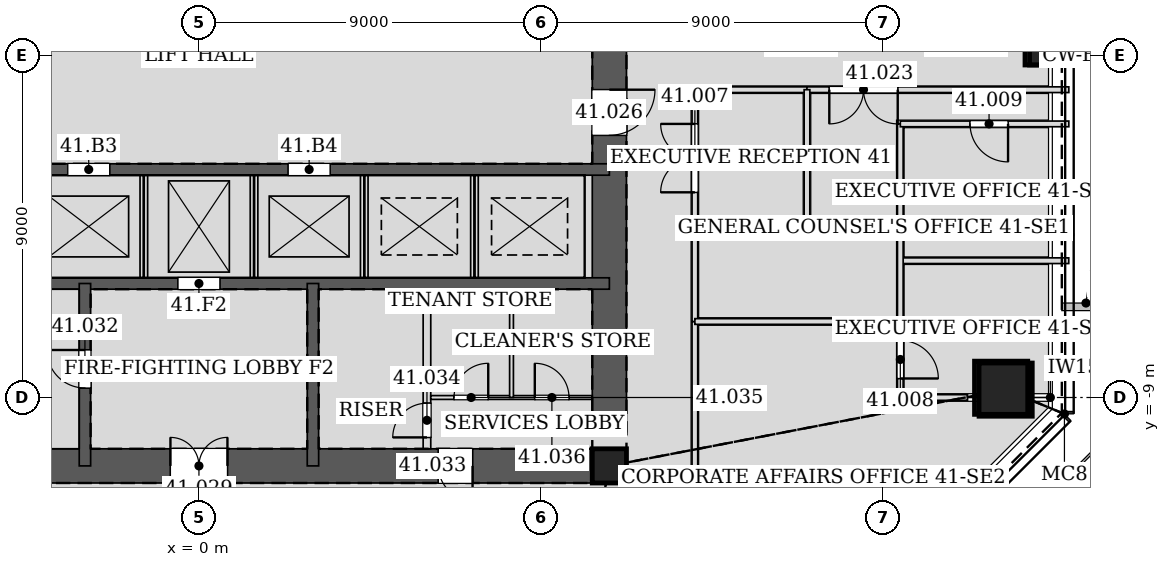
"""IFC4 building model, lengths in metres.
Left out: names, types, materials, properties, quantities, classifications, styles, units other than length and angle.
Written with IfcOpenShell. Run it as: python <this file> out.ifc"""

import sys

from ifc_helpers import new_model, si_unit, direction, frame, frame_2d, origin, origin_2d, place, context, subcontext, project, spatial, rectangle, hollow_rectangle, extrude, element, fill, save


model = new_model("IFC4")
c1 = context("Model", 3, precision=1e-05, world=origin(), true_north=direction((0.0, 1.0)))
c2 = subcontext(c1, "Body", "Model", "MODEL_VIEW")
j1 = project(units=[si_unit("LENGTHUNIT", "METRE"), si_unit("PLANEANGLEUNIT", "RADIAN")], contexts=[c1])
p1 = place(None, origin())
s1 = spatial("IfcSite", under=j1, at=p1, CompositionType="ELEMENT")
p2 = place(p1, origin())
s2 = spatial("IfcBuilding", under=s1, at=p2, CompositionType="ELEMENT")
p3 = place(p2, frame((0.0, 0.0, 180.6)))
s3 = spatial("IfcBuildingStorey", under=s2, at=p3, CompositionType="ELEMENT", Elevation=180.6)
p4 = place(p3, frame((21.228, -8.793, 0.0), z_axis=(-0.028237693676, 0.011678552323, 0.999533012997), x_axis=(-0.382183844423, -0.924086310396, 0.0)))
e1 = element("IfcColumn", 1, at=p4, inside=s3, PredefinedType="COLUMN", context=c2, shape_type="SweptSolid", body=[
    extrude(hollow_rectangle(XDim=1.4, YDim=1.4, WallThickness=0.065, at=origin_2d()), origin(), (0.0, 0.0, 1.0), 4.202),
])
p5 = place(p3, frame((22.106, 0.0, 0.0), z_axis=(-0.028239619523, 0.0, 0.999601182417), x_axis=(0.0, -1.0, 0.0)))
e2 = element("IfcColumn", 2, at=p5, inside=s3, PredefinedType="COLUMN", context=c2, shape_type="SweptSolid", body=[
    extrude(hollow_rectangle(XDim=0.5, YDim=0.5, WallThickness=0.025, at=origin_2d()), origin(), (0.0, 0.0, 1.0), 4.202),
])
p6 = place(p3, frame((10.8, -10.8, 0.0), z_axis=(0.0, 0.0, 1.0), x_axis=(1.0, 0.0, 0.0)))
e3 = element("IfcColumn", 3, at=p6, inside=s3, PredefinedType="COLUMN", context=c2, shape_type="SweptSolid", body=[
    extrude(hollow_rectangle(XDim=0.9, YDim=0.9, WallThickness=0.06, at=origin_2d()), origin(), (0.0, 0.0, 1.0), 4.2),
])
p7 = place(p3, frame((-10.8, -10.8, 0.0), z_axis=(0.0, 0.0, 1.0), x_axis=(1.0, 0.0, 0.0)))
e4 = element("IfcWall", 4, at=p7, inside=s3, PredefinedType="SOLIDWALL", context=c2, shape_type="SweptSolid", body=[
    extrude(rectangle(XDim=21.6, YDim=0.9, at=frame_2d((10.8, 0.0))), origin(), (0.0, 0.0, 1.0), 4.2),
])
p8 = place(p7, frame((10.05, 0.0, 0.0)))
e5 = element("IfcOpeningElement", 5, at=p8, cuts=e4, PredefinedType="OPENING", context=c2, shape_type="SweptSolid", body=[
    extrude(rectangle(XDim=1.5, YDim=2.1, at=frame_2d((0.75, 1.05))), frame((0.0, 0.46, 0.0), z_axis=(0.0, -1.0, 0.0), x_axis=(1.0, 0.0, 0.0)), (0.0, 0.0, 1.0), 0.92),
])
p9 = place(p7, frame((17.1, 0.0, 0.0)))
e6 = element("IfcOpeningElement", 6, at=p9, cuts=e4, PredefinedType="OPENING", context=c2, shape_type="SweptSolid", body=[
    extrude(rectangle(XDim=0.9, YDim=2.1, at=frame_2d((0.45, 1.05))), frame((0.0, 0.46, 0.0), z_axis=(0.0, -1.0, 0.0), x_axis=(1.0, 0.0, 0.0)), (0.0, 0.0, 1.0), 0.92),
])
p10 = place(p3, frame((10.8, -10.8, 0.0), z_axis=(0.0, 0.0, 1.0), x_axis=(0.0, 1.0, 0.0)))
e7 = element("IfcWall", 7, at=p10, inside=s3, PredefinedType="SOLIDWALL", context=c2, shape_type="SweptSolid", body=[
    extrude(rectangle(XDim=21.6, YDim=0.9, at=frame_2d((10.8, 0.0))), origin(), (0.0, 0.0, 1.0), 4.2),
])
p11 = place(p10, frame((11.7, 0.0, 0.0)))
e8 = element("IfcOpeningElement", 8, at=p11, cuts=e7, PredefinedType="OPENING", context=c2, shape_type="SweptSolid", body=[
    extrude(rectangle(XDim=1.2, YDim=2.1, at=frame_2d((0.6, 1.05))), frame((0.0, 0.46, 0.0), z_axis=(0.0, -1.0, 0.0), x_axis=(1.0, 0.0, 0.0)), (0.0, 0.0, 1.0), 0.92),
])
p12 = place(p10, frame((8.7, 0.0, 0.0)))
e9 = element("IfcOpeningElement", 9, at=p12, cuts=e7, PredefinedType="OPENING", context=c2, shape_type="SweptSolid", body=[
    extrude(rectangle(XDim=1.2, YDim=2.1, at=frame_2d((0.6, 1.05))), frame((0.0, 0.46, 0.0), z_axis=(0.0, -1.0, 0.0), x_axis=(1.0, 0.0, 0.0)), (0.0, 0.0, 1.0), 0.92),
])
p13 = place(p3, frame((-10.8, -3.0, 0.0), z_axis=(0.0, 0.0, 1.0), x_axis=(1.0, 0.0, 0.0)))
e10 = element("IfcWall", 10, at=p13, inside=s3, PredefinedType="SOLIDWALL", context=c2, shape_type="SweptSolid", body=[
    extrude(rectangle(XDim=21.6, YDim=0.3, at=frame_2d((10.8, 0.0))), origin(), (0.0, 0.0, 1.0), 4.2),
])
p14 = place(p13, frame((1.55, 0.0, 0.0)))
e11 = element("IfcOpeningElement", 11, at=p14, cuts=e10, PredefinedType="OPENING", context=c2, shape_type="SweptSolid", body=[
    extrude(rectangle(XDim=1.1, YDim=2.1, at=frame_2d((0.55, 1.05))), frame((0.0, 0.16, 0.0), z_axis=(0.0, -1.0, 0.0), x_axis=(1.0, 0.0, 0.0)), (0.0, 0.0, 1.0), 0.32),
])
p15 = place(p13, frame((4.45, 0.0, 0.0)))
e12 = element("IfcOpeningElement", 12, at=p15, cuts=e10, PredefinedType="OPENING", context=c2, shape_type="SweptSolid", body=[
    extrude(rectangle(XDim=1.1, YDim=2.1, at=frame_2d((0.55, 1.05))), frame((0.0, 0.16, 0.0), z_axis=(0.0, -1.0, 0.0), x_axis=(1.0, 0.0, 0.0)), (0.0, 0.0, 1.0), 0.32),
])
p16 = place(p13, frame((7.35, 0.0, 0.0)))
e13 = element("IfcOpeningElement", 13, at=p16, cuts=e10, PredefinedType="OPENING", context=c2, shape_type="SweptSolid", body=[
    extrude(rectangle(XDim=1.1, YDim=2.1, at=frame_2d((0.55, 1.05))), frame((0.0, 0.16, 0.0), z_axis=(0.0, -1.0, 0.0), x_axis=(1.0, 0.0, 0.0)), (0.0, 0.0, 1.0), 0.32),
])
p17 = place(p13, frame((13.15, 0.0, 0.0)))
e14 = element("IfcOpeningElement", 14, at=p17, cuts=e10, PredefinedType="OPENING", context=c2, shape_type="SweptSolid", body=[
    extrude(rectangle(XDim=1.1, YDim=2.1, at=frame_2d((0.55, 1.05))), frame((0.0, 0.16, 0.0), z_axis=(0.0, -1.0, 0.0), x_axis=(1.0, 0.0, 0.0)), (0.0, 0.0, 1.0), 0.32),
])
p18 = place(p3, frame((-10.8, -6.0, 0.0), z_axis=(0.0, 0.0, 1.0), x_axis=(1.0, 0.0, 0.0)))
e15 = element("IfcWall", 15, at=p18, inside=s3, PredefinedType="SOLIDWALL", context=c2, shape_type="SweptSolid", body=[
    extrude(rectangle(XDim=21.6, YDim=0.3, at=frame_2d((10.8, 0.0))), origin(), (0.0, 0.0, 1.0), 4.2),
])
p19 = place(p18, frame((10.25, 0.0, 0.0)))
e16 = element("IfcOpeningElement", 16, at=p19, cuts=e15, PredefinedType="OPENING", context=c2, shape_type="SweptSolid", body=[
    extrude(rectangle(XDim=1.1, YDim=2.1, at=frame_2d((0.55, 1.05))), frame((0.0, 0.16, 0.0), z_axis=(0.0, -1.0, 0.0), x_axis=(1.0, 0.0, 0.0)), (0.0, 0.0, 1.0), 0.32),
])
p20 = place(p3, frame((-3.0, -6.0, 0.0), z_axis=(0.0, 0.0, 1.0), x_axis=(0.0, -1.0, 0.0)))
e17 = element("IfcWall", 17, at=p20, inside=s3, PredefinedType="SOLIDWALL", context=c2, shape_type="SweptSolid", body=[
    extrude(rectangle(XDim=4.8, YDim=0.3, at=frame_2d((2.4, 0.0))), origin(), (0.0, 0.0, 1.0), 4.2),
])
p21 = place(p20, frame((1.75, 0.0, 0.0)))
e18 = element("IfcOpeningElement", 18, at=p21, cuts=e17, PredefinedType="OPENING", context=c2, shape_type="SweptSolid", body=[
    extrude(rectangle(XDim=1.0, YDim=2.1, at=frame_2d((0.5, 1.05))), frame((0.0, 0.16, 0.0), z_axis=(0.0, -1.0, 0.0), x_axis=(1.0, 0.0, 0.0)), (0.0, 0.0, 1.0), 0.32),
])
p22 = place(p3, frame((3.0, -6.0, 0.0), z_axis=(0.0, 0.0, 1.0), x_axis=(0.0, -1.0, 0.0)))
e19 = element("IfcWall", 19, at=p22, inside=s3, PredefinedType="SOLIDWALL", context=c2, shape_type="SweptSolid", body=[
    extrude(rectangle(XDim=4.8, YDim=0.3, at=frame_2d((2.4, 0.0))), origin(), (0.0, 0.0, 1.0), 4.2),
])
p23 = place(p3, frame((13.05, -4.501, 0.0), z_axis=(0.0, 0.0, 1.0), x_axis=(0.0, 1.0, 0.0)))
e20 = element("IfcWall", 20, at=p23, inside=s3, PredefinedType="PARTITIONING", context=c2, shape_type="SweptSolid", body=[
    extrude(rectangle(XDim=3.601, YDim=0.15, at=frame_2d((1.801, 0.0))), origin(), (0.0, 0.0, 1.0), 4.035),
])
p24 = place(p23, frame((0.9, 0.0, 0.0)))
e21 = element("IfcOpeningElement", 21, at=p24, cuts=e20, PredefinedType="OPENING", context=c2, shape_type="SweptSolid", body=[
    extrude(rectangle(XDim=1.8, YDim=2.4, at=frame_2d((0.9, 1.2))), frame((0.0, 0.085, 0.0), z_axis=(0.0, -1.0, 0.0), x_axis=(1.0, 0.0, 0.0)), (0.0, 0.0, 1.0), 0.17),
])
p25 = place(p3, frame((13.05, -0.9, 0.0), z_axis=(0.0, 0.0, 1.0), x_axis=(1.0, 0.0, 0.0)))
e22 = element("IfcWall", 22, at=p25, inside=s3, PredefinedType="PARTITIONING", context=c2, shape_type="SweptSolid", body=[
    extrude(rectangle(XDim=2.951, YDim=0.15, at=frame_2d((1.476, 0.0))), origin(), (0.0, 0.0, 1.0), 3.426),
])
p26 = place(p3, frame((13.05, -13.05, 0.0), z_axis=(0.0, 0.0, 1.0), x_axis=(0.0, 1.0, 0.0)))
e23 = element("IfcWall", 23, at=p26, inside=s3, PredefinedType="PARTITIONING", context=c2, shape_type="SweptSolid", body=[
    extrude(rectangle(XDim=6.051, YDim=0.15, at=frame_2d((3.025, 0.0))), origin(), (0.0, 0.0, 1.0), 3.167),
])
p27 = place(p3, frame((13.05, -7.001, 0.0), z_axis=(0.0, 0.0, 1.0), x_axis=(0.0, 1.0, 0.0)))
e24 = element("IfcWall", 24, at=p27, inside=s3, PredefinedType="PARTITIONING", context=c2, shape_type="SweptSolid", body=[
    extrude(rectangle(XDim=2.502, YDim=0.15, at=frame_2d((1.251, 0.0))), origin(), (0.0, 0.0, 1.0), 4.035),
])
p28 = place(p3, frame((15.999, -0.9, 0.0), z_axis=(0.0, 0.0, 1.0), x_axis=(1.0, 0.0, 0.0)))
e25 = element("IfcWall", 25, at=p28, inside=s3, PredefinedType="PARTITIONING", context=c2, shape_type="SweptSolid", body=[
    extrude(rectangle(XDim=6.891, YDim=0.15, at=frame_2d((3.445, 0.0))), origin(), (0.0, 0.0, 1.0), 3.426),
])
p29 = place(p28, frame((0.588, 0.0, 0.0)))
e26 = element("IfcOpeningElement", 26, at=p29, cuts=e25, PredefinedType="OPENING", context=c2, shape_type="SweptSolid", body=[
    extrude(rectangle(XDim=1.8, YDim=2.4, at=frame_2d((0.9, 1.2))), frame((0.0, 0.085, 0.0), z_axis=(0.0, -1.0, 0.0), x_axis=(1.0, 0.0, 0.0)), (0.0, 0.0, 1.0), 0.17),
])
p30 = place(p3, frame((13.05, -4.5, 0.0), z_axis=(0.0, 0.0, 1.0), x_axis=(1.0, 0.0, 0.0)))
e27 = element("IfcWall", 27, at=p30, inside=s3, PredefinedType="PARTITIONING", context=c2, shape_type="SweptSolid", body=[
    extrude(rectangle(XDim=2.95, YDim=0.15, at=frame_2d((1.475, 0.0))), origin(), (0.0, 0.0, 1.0), 3.426),
])
p31 = place(p3, frame((16.0, -4.5, 0.0), z_axis=(0.0, 0.0, 1.0), x_axis=(0.0, 1.0, 0.0)))
e28 = element("IfcWall", 28, at=p31, inside=s3, PredefinedType="PARTITIONING", context=c2, shape_type="SweptSolid", body=[
    extrude(rectangle(XDim=3.6, YDim=0.15, at=frame_2d((1.8, 0.0))), origin(), (0.0, 0.0, 1.0), 4.035),
])
p32 = place(p3, frame((22.888, -5.4, 0.0), z_axis=(0.0, 0.0, 1.0), x_axis=(-1.0, 0.0, 0.0)))
e29 = element("IfcWall", 29, at=p32, inside=s3, PredefinedType="PARTITIONING", context=c2, shape_type="SweptSolid", body=[
    extrude(rectangle(XDim=4.432, YDim=0.15, at=frame_2d((2.216, 0.0))), origin(), (0.0, 0.0, 1.0), 3.426),
])
p33 = place(p3, frame((18.456, -6.999, 0.0), z_axis=(0.0, 0.0, 1.0), x_axis=(0.0, -1.0, 0.0)))
e30 = element("IfcWall", 30, at=p33, inside=s3, PredefinedType="PARTITIONING", context=c2, shape_type="SweptSolid", body=[
    extrude(rectangle(XDim=2.001, YDim=0.15, at=frame_2d((1.0, 0.0))), origin(), (0.0, 0.0, 1.0), 4.035),
])
p34 = place(p33, frame((0.5, 0.0, 0.0)))
e31 = element("IfcOpeningElement", 31, at=p34, cuts=e30, PredefinedType="OPENING", context=c2, shape_type="SweptSolid", body=[
    extrude(rectangle(XDim=1.0, YDim=2.1, at=frame_2d((0.5, 1.05))), frame((0.0, 0.085, 0.0), z_axis=(0.0, -1.0, 0.0), x_axis=(1.0, 0.0, 0.0)), (0.0, 0.0, 1.0), 0.17),
])
p35 = place(p3, frame((18.456, -9.0, 0.0), z_axis=(0.0, 0.0, 1.0), x_axis=(1.0, 0.0, 0.0)))
e32 = element("IfcWall", 32, at=p35, inside=s3, PredefinedType="PARTITIONING", context=c2, shape_type="SweptSolid", body=[
    extrude(rectangle(XDim=1.768, YDim=0.15, at=frame_2d((0.884, 0.0))), origin(), (0.0, 0.0, 1.0), 3.167),
])
p36 = place(p3, frame((21.92, -9.0, 0.0), z_axis=(0.0, 0.0, 1.0), x_axis=(1.0, 0.0, 0.0)))
e33 = element("IfcWall", 33, at=p36, inside=s3, PredefinedType="PARTITIONING", context=c2, shape_type="SweptSolid", body=[
    extrude(rectangle(XDim=0.967, YDim=0.15, at=frame_2d((0.484, 0.0))), origin(), (0.0, 0.0, 1.0), 4.035),
])
p37 = place(p3, frame((18.456, -7.001, 0.0), z_axis=(0.0, 0.0, 1.0), x_axis=(0.0, 1.0, 0.0)))
e34 = element("IfcWall", 34, at=p37, inside=s3, PredefinedType="PARTITIONING", context=c2, shape_type="SweptSolid", body=[
    extrude(rectangle(XDim=5.201, YDim=0.15, at=frame_2d((2.601, 0.0))), origin(), (0.0, 0.0, 1.0), 4.035),
])
p38 = place(p3, frame((22.89, -1.8, 0.0), z_axis=(0.0, 0.0, 1.0), x_axis=(-1.0, 0.0, 0.0)))
e35 = element("IfcWall", 35, at=p38, inside=s3, PredefinedType="PARTITIONING", context=c2, shape_type="SweptSolid", body=[
    extrude(rectangle(XDim=4.434, YDim=0.15, at=frame_2d((2.217, 0.0))), origin(), (0.0, 0.0, 1.0), 3.426),
])
p39 = place(p38, frame((1.599, 0.0, 0.0)))
e36 = element("IfcOpeningElement", 36, at=p39, cuts=e35, PredefinedType="OPENING", context=c2, shape_type="SweptSolid", body=[
    extrude(rectangle(XDim=1.0, YDim=2.1, at=frame_2d((0.5, 1.05))), frame((0.0, 0.085, 0.0), z_axis=(0.0, -1.0, 0.0), x_axis=(1.0, 0.0, 0.0)), (0.0, 0.0, 1.0), 0.17),
])
p40 = place(p3, frame((18.456, -7.0, 0.0), z_axis=(0.0, 0.0, 1.0), x_axis=(-1.0, 0.0, 0.0)))
e37 = element("IfcWall", 37, at=p40, inside=s3, PredefinedType="PARTITIONING", context=c2, shape_type="SweptSolid", body=[
    extrude(rectangle(XDim=5.406, YDim=0.15, at=frame_2d((2.703, 0.0))), origin(), (0.0, 0.0, 1.0), 3.426),
])
for number, where, z_axis, x_axis in (
    (38, (-1.45, -5.85, 0.0), (0.0, 0.0, 1.0), (0.0, 1.0, 0.0)),
    (39, (1.45, -5.85, 0.0), (0.0, 0.0, 1.0), (0.0, 1.0, 0.0)),
    (40, (4.35, -5.85, 0.0), (0.0, 0.0, 1.0), (0.0, 1.0, 0.0)),
    (41, (7.25, -5.85, 0.0), (0.0, 0.0, 1.0), (0.0, 1.0, 0.0)),
):
    element("IfcWall", number, at=place(p3, frame(where, z_axis=z_axis, x_axis=x_axis)), inside=s3, PredefinedType="PARTITIONING", context=c2, shape_type="SweptSolid", body=[
        extrude(rectangle(XDim=2.7, YDim=0.2, at=frame_2d((1.35, 0.0))), origin(), (0.0, 0.0, 1.0), 4.2),
    ])
p41 = place(p3, frame((6.0, -10.35, 0.0), z_axis=(0.0, 0.0, 1.0), x_axis=(0.0, 1.0, 0.0)))
e42 = element("IfcWall", 42, at=p41, inside=s3, PredefinedType="PARTITIONING", context=c2, shape_type="SweptSolid", body=[
    extrude(rectangle(XDim=4.2, YDim=0.2, at=frame_2d((2.1, 0.0))), origin(), (0.0, 0.0, 1.0), 4.035),
])
p42 = place(p41, frame((0.3, 0.0, 0.0)))
e43 = element("IfcOpeningElement", 43, at=p42, cuts=e42, PredefinedType="OPENING", context=c2, shape_type="SweptSolid", body=[
    extrude(rectangle(XDim=0.9, YDim=2.1, at=frame_2d((0.45, 1.05))), frame((0.0, 0.11, 0.0), z_axis=(0.0, -1.0, 0.0), x_axis=(1.0, 0.0, 0.0)), (0.0, 0.0, 1.0), 0.22),
])
p43 = place(p3, frame((6.1, -9.0, 0.0), z_axis=(0.0, 0.0, 1.0), x_axis=(1.0, 0.0, 0.0)))
e44 = element("IfcWall", 44, at=p43, inside=s3, PredefinedType="PARTITIONING", context=c2, shape_type="SweptSolid", body=[
    extrude(rectangle(XDim=4.25, YDim=0.1, at=frame_2d((2.125, 0.0))), origin(), (0.0, 0.0, 1.0), 4.035),
])
p44 = place(p43, frame((0.613, 0.0, 0.0)))
e45 = element("IfcOpeningElement", 45, at=p44, cuts=e44, PredefinedType="OPENING", context=c2, shape_type="SweptSolid", body=[
    extrude(rectangle(XDim=0.9, YDim=2.1, at=frame_2d((0.45, 1.05))), frame((0.0, 0.06, 0.0), z_axis=(0.0, -1.0, 0.0), x_axis=(1.0, 0.0, 0.0)), (0.0, 0.0, 1.0), 0.12),
])
p45 = place(p43, frame((2.738, 0.0, 0.0)))
e46 = element("IfcOpeningElement", 46, at=p45, cuts=e44, PredefinedType="OPENING", context=c2, shape_type="SweptSolid", body=[
    extrude(rectangle(XDim=0.9, YDim=2.1, at=frame_2d((0.45, 1.05))), frame((0.0, 0.06, 0.0), z_axis=(0.0, -1.0, 0.0), x_axis=(1.0, 0.0, 0.0)), (0.0, 0.0, 1.0), 0.12),
])
p46 = place(p3, frame((8.225, -9.0, 0.0), z_axis=(0.0, 0.0, 1.0), x_axis=(0.0, 1.0, 0.0)))
e47 = element("IfcWall", 47, at=p46, inside=s3, PredefinedType="PARTITIONING", context=c2, shape_type="SweptSolid", body=[
    extrude(rectangle(XDim=2.85, YDim=0.1, at=frame_2d((1.425, 0.0))), origin(), (0.0, 0.0, 1.0), 4.035),
])
p47 = place(p24, origin())
e48 = element("IfcDoor", 48, at=p47, inside=s3, OperationType="DOUBLE_DOOR_SINGLE_SWING", PredefinedType="DOOR", context=c2, shape_type="SweptSolid", body=[
    extrude(rectangle(XDim=1.8, YDim=2.4, at=frame_2d((0.9, 1.2))), frame((0.0, 0.025, 0.0), z_axis=(0.0, -1.0, 0.0), x_axis=(1.0, 0.0, 0.0)), (0.0, 0.0, 1.0), 0.05),
])
fill(e21, e48)
p48 = place(p34, origin())
e49 = element("IfcDoor", 49, at=p48, inside=s3, OperationType="SINGLE_SWING_RIGHT", PredefinedType="DOOR", context=c2, shape_type="SweptSolid", body=[
    extrude(rectangle(XDim=1.0, YDim=2.1, at=frame_2d((0.5, 1.05))), frame((0.0, 0.025, 0.0), z_axis=(0.0, -1.0, 0.0), x_axis=(1.0, 0.0, 0.0)), (0.0, 0.0, 1.0), 0.05),
])
fill(e31, e49)
p49 = place(p39, origin())
e50 = element("IfcDoor", 50, at=p49, inside=s3, OperationType="SINGLE_SWING_LEFT", PredefinedType="DOOR", context=c2, shape_type="SweptSolid", body=[
    extrude(rectangle(XDim=1.0, YDim=2.1, at=frame_2d((0.5, 1.05))), frame((0.0, 0.025, 0.0), z_axis=(0.0, -1.0, 0.0), x_axis=(1.0, 0.0, 0.0)), (0.0, 0.0, 1.0), 0.05),
])
fill(e36, e50)
p50 = place(p29, frame((1.8, 0.0, 0.0), z_axis=(0.0, 0.0, 1.0), x_axis=(-1.0, 0.0, 0.0)))
e51 = element("IfcDoor", 51, at=p50, inside=s3, OperationType="DOUBLE_DOOR_SINGLE_SWING", PredefinedType="DOOR", context=c2, shape_type="SweptSolid", body=[
    extrude(rectangle(XDim=1.8, YDim=2.4, at=frame_2d((0.9, 1.2))), frame((0.0, 0.025, 0.0), z_axis=(0.0, -1.0, 0.0), x_axis=(1.0, 0.0, 0.0)), (0.0, 0.0, 1.0), 0.05),
])
fill(e26, e51)
p51 = place(p12, frame((1.2, 0.0, 0.0), z_axis=(0.0, 0.0, 1.0), x_axis=(-1.0, 0.0, 0.0)))
e52 = element("IfcDoor", 52, at=p51, inside=s3, OperationType="SINGLE_SWING_LEFT", PredefinedType="DOOR", context=c2, shape_type="SweptSolid", body=[
    extrude(rectangle(XDim=1.2, YDim=2.1, at=frame_2d((0.6, 1.05))), frame((0.0, 0.025, 0.0), z_axis=(0.0, -1.0, 0.0), x_axis=(1.0, 0.0, 0.0)), (0.0, 0.0, 1.0), 0.05),
])
fill(e9, e52)
p52 = place(p8, origin())
e53 = element("IfcDoor", 53, at=p52, inside=s3, OperationType="DOUBLE_DOOR_SINGLE_SWING", PredefinedType="DOOR", context=c2, shape_type="SweptSolid", body=[
    extrude(rectangle(XDim=1.5, YDim=2.1, at=frame_2d((0.75, 1.05))), frame((0.0, 0.025, 0.0), z_axis=(0.0, -1.0, 0.0), x_axis=(1.0, 0.0, 0.0)), (0.0, 0.0, 1.0), 0.05),
])
fill(e5, e53)
p53 = place(p21, frame((1.0, 0.0, 0.0), z_axis=(0.0, 0.0, 1.0), x_axis=(-1.0, 0.0, 0.0)))
e54 = element("IfcDoor", 54, at=p53, inside=s3, OperationType="SINGLE_SWING_RIGHT", PredefinedType="DOOR", context=c2, shape_type="SweptSolid", body=[
    extrude(rectangle(XDim=1.0, YDim=2.1, at=frame_2d((0.5, 1.05))), frame((0.0, 0.025, 0.0), z_axis=(0.0, -1.0, 0.0), x_axis=(1.0, 0.0, 0.0)), (0.0, 0.0, 1.0), 0.05),
])
fill(e18, e54)
p54 = place(p9, frame((0.9, 0.0, 0.0), z_axis=(0.0, 0.0, 1.0), x_axis=(-1.0, 0.0, 0.0)))
e55 = element("IfcDoor", 55, at=p54, inside=s3, OperationType="SINGLE_SWING_LEFT", PredefinedType="DOOR", context=c2, shape_type="SweptSolid", body=[
    extrude(rectangle(XDim=0.9, YDim=2.1, at=frame_2d((0.45, 1.05))), frame((0.0, 0.025, 0.0), z_axis=(0.0, -1.0, 0.0), x_axis=(1.0, 0.0, 0.0)), (0.0, 0.0, 1.0), 0.05),
])
fill(e6, e55)
p55 = place(p42, origin())
e56 = element("IfcDoor", 56, at=p55, inside=s3, OperationType="SINGLE_SWING_LEFT", PredefinedType="DOOR", context=c2, shape_type="SweptSolid", body=[
    extrude(rectangle(XDim=0.9, YDim=2.1, at=frame_2d((0.45, 1.05))), frame((0.0, 0.025, 0.0), z_axis=(0.0, -1.0, 0.0), x_axis=(1.0, 0.0, 0.0)), (0.0, 0.0, 1.0), 0.05),
])
fill(e43, e56)
p56 = place(p44, origin())
e57 = element("IfcDoor", 57, at=p56, inside=s3, OperationType="SINGLE_SWING_RIGHT", PredefinedType="DOOR", context=c2, shape_type="SweptSolid", body=[
    extrude(rectangle(XDim=0.9, YDim=2.1, at=frame_2d((0.45, 1.05))), frame((0.0, 0.025, 0.0), z_axis=(0.0, -1.0, 0.0), x_axis=(1.0, 0.0, 0.0)), (0.0, 0.0, 1.0), 0.05),
])
fill(e45, e57)
p57 = place(p45, origin())
e58 = element("IfcDoor", 58, at=p57, inside=s3, OperationType="SINGLE_SWING_LEFT", PredefinedType="DOOR", context=c2, shape_type="SweptSolid", body=[
    extrude(rectangle(XDim=0.9, YDim=2.1, at=frame_2d((0.45, 1.05))), frame((0.0, 0.025, 0.0), z_axis=(0.0, -1.0, 0.0), x_axis=(1.0, 0.0, 0.0)), (0.0, 0.0, 1.0), 0.05),
])
fill(e46, e58)
p58 = place(p16, origin())
e59 = element("IfcDoor", 59, at=p58, inside=s3, OperationType="DOUBLE_DOOR_SLIDING", PredefinedType="DOOR", context=c2, shape_type="SweptSolid", body=[
    extrude(rectangle(XDim=1.1, YDim=2.1, at=frame_2d((0.55, 1.05))), frame((0.0, 0.025, 0.0), z_axis=(0.0, -1.0, 0.0), x_axis=(1.0, 0.0, 0.0)), (0.0, 0.0, 1.0), 0.05),
])
fill(e13, e59)
p59 = place(p19, origin())
e60 = element("IfcDoor", 60, at=p59, inside=s3, OperationType="DOUBLE_DOOR_SLIDING", PredefinedType="DOOR", context=c2, shape_type="SweptSolid", body=[
    extrude(rectangle(XDim=1.1, YDim=2.1, at=frame_2d((0.55, 1.05))), frame((0.0, 0.025, 0.0), z_axis=(0.0, -1.0, 0.0), x_axis=(1.0, 0.0, 0.0)), (0.0, 0.0, 1.0), 0.05),
])
fill(e16, e60)
p60 = place(p17, origin())
e61 = element("IfcDoor", 61, at=p60, inside=s3, OperationType="DOUBLE_DOOR_SLIDING", PredefinedType="DOOR", context=c2, shape_type="SweptSolid", body=[
    extrude(rectangle(XDim=1.1, YDim=2.1, at=frame_2d((0.55, 1.05))), frame((0.0, 0.025, 0.0), z_axis=(0.0, -1.0, 0.0), x_axis=(1.0, 0.0, 0.0)), (0.0, 0.0, 1.0), 0.05),
])
fill(e14, e61)
save(model, sys.argv[1])
